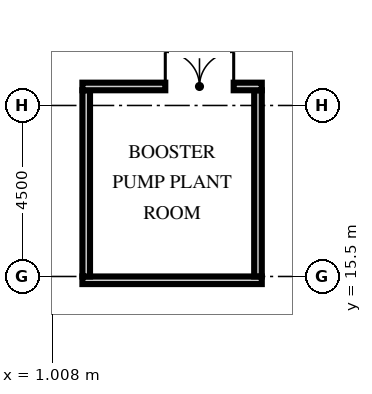
"""IFC4 building model, lengths in metres.
Left out: names, types, materials, properties, quantities, classifications, styles, units other than length and angle.
Written with IfcOpenShell. Run it as: python <this file> out.ifc"""

import sys

from ifc_helpers import new_model, si_unit, direction, frame, frame_2d, origin, origin_2d, place, context, subcontext, project, spatial, rectangle, extrude, element, fill, save


model = new_model("IFC4")
c1 = context("Model", 3, precision=1e-05, world=origin(), true_north=direction((0.0, 1.0)))
c2 = subcontext(c1, "Body", "Model", "MODEL_VIEW")
j1 = project(units=[si_unit("LENGTHUNIT", "METRE"), si_unit("PLANEANGLEUNIT", "RADIAN")], contexts=[c1])
p1 = place(None, origin())
s1 = spatial("IfcSite", under=j1, at=p1, CompositionType="ELEMENT")
p2 = place(p1, origin())
s2 = spatial("IfcBuilding", under=s1, at=p2, CompositionType="ELEMENT")
p3 = place(p2, frame((0.0, 0.0, 278.25)))
s3 = spatial("IfcBuildingStorey", under=s2, at=p3, CompositionType="ELEMENT", Elevation=278.25)
p4 = place(p3, frame((0.0, 24.4, -0.65), z_axis=(0.0, -0.334765406017, 0.942301503201), x_axis=(1.0, 0.0, 0.0)))
e1 = element("IfcColumn", 1, at=p4, inside=s3, PredefinedType="COLUMN", context=c2, shape_type="SweptSolid", body=[
    extrude(rectangle(XDim=2.8, YDim=1.8, at=origin_2d()), origin(), (0.0, 0.0, 1.0), 8.065),
])
p5 = place(p3, frame((8.32, 24.4, -0.65), z_axis=(-0.103601510687, -0.332963994967, 0.937230870724), x_axis=(0.994618884766, -0.034712905596, 0.097612951251)))
e2 = element("IfcColumn", 2, at=p5, inside=s3, PredefinedType="COLUMN", context=c2, shape_type="SweptSolid", body=[
    extrude(rectangle(XDim=2.8, YDim=1.8, at=origin_2d()), origin(), (0.0, 0.0, 1.0), 8.109),
])
p6 = place(p3, frame((1.8, 15.4, 0.0), z_axis=(0.0, 0.0, 1.0), x_axis=(1.0, 0.0, 0.0)))
e3 = element("IfcWall", 3, at=p6, inside=s3, PredefinedType="SOLIDWALL", context=c2, shape_type="SweptSolid", body=[
    extrude(rectangle(XDim=4.72, YDim=0.2, at=frame_2d((2.36, 0.0))), origin(), (0.0, 0.0, 1.0), 6.56),
])
for number, where, z_axis, x_axis in (
    (4, (1.9, 15.5, 0.0), (0.0, 0.0, 1.0), (0.0, 1.0, 0.0)),
    (5, (6.42, 15.5, 0.0), (0.0, 0.0, 1.0), (0.0, 1.0, 0.0)),
):
    element("IfcWall", number, at=place(p3, frame(where, z_axis=z_axis, x_axis=x_axis)), inside=s3, PredefinedType="SOLIDWALL", context=c2, shape_type="SweptSolid", body=[
        extrude(rectangle(XDim=4.9, YDim=0.2, at=frame_2d((2.45, 0.0))), origin(), (0.0, 0.0, 1.0), 7.25),
    ])
p7 = place(p3, frame((1.8, 20.5, 0.0), z_axis=(0.0, 0.0, 1.0), x_axis=(1.0, 0.0, 0.0)))
e6 = element("IfcWall", 6, at=p7, inside=s3, PredefinedType="SOLIDWALL", context=c2, shape_type="SweptSolid", body=[
    extrude(rectangle(XDim=4.72, YDim=0.2, at=frame_2d((2.36, 0.0))), origin(), (0.0, 0.0, 1.0), 6.56),
])
p8 = place(p7, frame((2.181, 0.0, 0.0)))
e7 = element("IfcOpeningElement", 7, at=p8, cuts=e6, PredefinedType="OPENING", context=c2, shape_type="SweptSolid", body=[
    extrude(rectangle(XDim=1.8, YDim=2.4, at=frame_2d((0.9, 1.2))), frame((0.0, 0.11, 0.0), z_axis=(0.0, -1.0, 0.0), x_axis=(1.0, 0.0, 0.0)), (0.0, 0.0, 1.0), 0.22),
])
p9 = place(p8, origin())
e8 = element("IfcDoor", 8, at=p9, inside=s3, OperationType="DOUBLE_DOOR_SINGLE_SWING", PredefinedType="DOOR", context=c2, shape_type="SweptSolid", body=[
    extrude(rectangle(XDim=1.8, YDim=2.4, at=frame_2d((0.9, 1.2))), frame((0.0, 0.025, 0.0), z_axis=(0.0, -1.0, 0.0), x_axis=(1.0, 0.0, 0.0)), (0.0, 0.0, 1.0), 0.05),
])
fill(e7, e8)
save(model, sys.argv[1])
